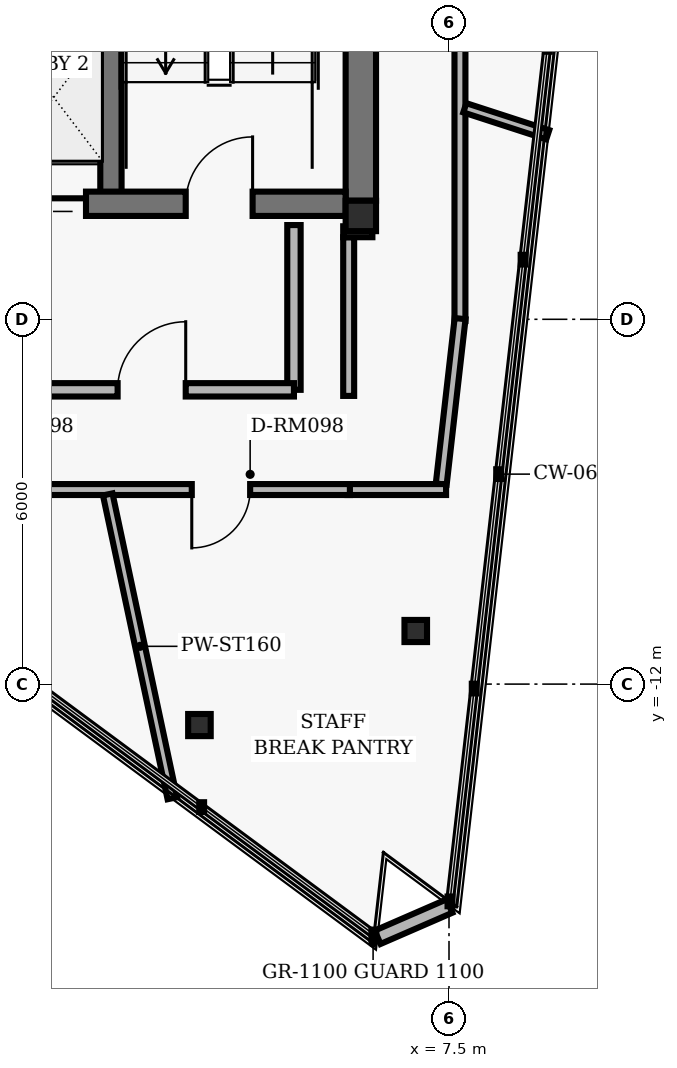
"""IFC4 building model, lengths in metres.
Left out: names, types, materials, properties, quantities, classifications, styles, units other than length and angle.
Written with IfcOpenShell. Run it as: python <this file> out.ifc"""

import sys

from ifc_helpers import new_model, si_unit, direction, frame, frame_2d, origin, origin_2d, place, context, subcontext, project, spatial, rectangle, hollow_rectangle, i_section, extrude, element, fill, save


model = new_model("IFC4")
c1 = context("Model", 3, precision=1e-05, world=origin(), true_north=direction((0.0, 1.0)))
c2 = subcontext(c1, "Body", "Model", "MODEL_VIEW")
j1 = project(units=[si_unit("LENGTHUNIT", "METRE"), si_unit("PLANEANGLEUNIT", "RADIAN")], contexts=[c1])
p1 = place(None, origin())
s1 = spatial("IfcSite", under=j1, at=p1, CompositionType="ELEMENT")
p2 = place(p1, origin())
s2 = spatial("IfcBuilding", under=s1, at=p2, CompositionType="ELEMENT")
p3 = place(p2, frame((0.0, 0.0, 249.12)))
s3 = spatial("IfcBuildingStorey", under=s2, at=p3, CompositionType="ELEMENT", Elevation=249.12)
p4 = place(p3, frame((6.05, -4.3, 0.0), z_axis=(0.0, 0.0, 1.0), x_axis=(1.0, 0.0, 0.0)))
e1 = element("IfcColumn", 1, at=p4, inside=s3, PredefinedType="COLUMN", context=c2, shape_type="SweptSolid", body=[
    extrude(hollow_rectangle(XDim=0.5, YDim=0.5, WallThickness=0.02, InnerFilletRadius=0.02, OuterFilletRadius=0.04, at=origin_2d()), origin(), (0.0, 0.0, 1.0), 2.88),
])
p5 = place(p3, frame((6.05, -4.05, 0.0), z_axis=(0.0, 0.0, 1.0), x_axis=(0.0, 1.0, 0.0)))
e2 = element("IfcWall", 2, at=p5, inside=s3, PredefinedType="SHEAR", context=c2, shape_type="SweptSolid", body=[
    extrude(rectangle(XDim=3.8, YDim=0.5, at=frame_2d((1.9, 0.0))), origin(), (0.0, 0.0, 1.0), 2.648),
])
p6 = place(p3, frame((1.94, -4.1, 0.0), z_axis=(0.0, 0.0, 1.0), x_axis=(0.0, 1.0, 0.0)))
e3 = element("IfcWall", 3, at=p6, inside=s3, PredefinedType="SHEAR", context=c2, shape_type="SweptSolid", body=[
    extrude(rectangle(XDim=8.2, YDim=0.35, at=frame_2d((4.1, 0.0))), origin(), (0.0, 0.0, 1.0), 2.648),
])
p7 = place(p3, frame((-5.8, -4.1, 0.0), z_axis=(0.0, 0.0, 1.0), x_axis=(1.0, 0.0, 0.0)))
e4 = element("IfcWall", 4, at=p7, inside=s3, PredefinedType="SHEAR", context=c2, shape_type="SweptSolid", body=[
    extrude(rectangle(XDim=11.6, YDim=0.4, at=frame_2d((5.8, 0.0))), origin(), (0.0, 0.0, 1.0), 2.648),
])
p8 = place(p7, frame((1.53, 0.0, 0.0)))
e5 = element("IfcOpeningElement", 5, at=p8, cuts=e4, PredefinedType="OPENING", context=c2, shape_type="SweptSolid", body=[
    extrude(rectangle(XDim=1.1, YDim=2.04, at=frame_2d((0.55, 1.02))), frame((0.0, 0.21, 0.0), z_axis=(0.0, -1.0, 0.0), x_axis=(1.0, 0.0, 0.0)), (0.0, 0.0, 1.0), 0.42),
])
p9 = place(p7, frame((8.97, 0.0, 0.0)))
e6 = element("IfcOpeningElement", 6, at=p9, cuts=e4, PredefinedType="OPENING", context=c2, shape_type="SweptSolid", body=[
    extrude(rectangle(XDim=1.1, YDim=2.04, at=frame_2d((0.55, 1.02))), frame((0.0, 0.21, 0.0), z_axis=(0.0, -1.0, 0.0), x_axis=(1.0, 0.0, 0.0)), (0.0, 0.0, 1.0), 0.42),
])
p10 = place(p7, frame((4.27, 0.0, 0.0)))
e7 = element("IfcOpeningElement", 7, at=p10, cuts=e4, PredefinedType="OPENING", context=c2, shape_type="SweptSolid", body=[
    extrude(rectangle(XDim=1.06, YDim=2.04, at=frame_2d((0.53, 1.02))), frame((0.0, 0.21, 0.0), z_axis=(0.0, -1.0, 0.0), x_axis=(1.0, 0.0, 0.0)), (0.0, 0.0, 1.0), 0.42),
])
p11 = place(p7, frame((6.27, 0.0, 0.0)))
e8 = element("IfcOpeningElement", 8, at=p11, cuts=e4, PredefinedType="OPENING", context=c2, shape_type="SweptSolid", body=[
    extrude(rectangle(XDim=1.06, YDim=2.04, at=frame_2d((0.53, 1.02))), frame((0.0, 0.21, 0.0), z_axis=(0.0, -1.0, 0.0), x_axis=(1.0, 0.0, 0.0)), (0.0, 0.0, 1.0), 0.42),
])
for number, where, z_axis, x_axis in (
    (9, (6.953, -11.127, 0.0), (0.0, 0.0, 1.0), (1.0, 0.0, 0.0)),
    (10, (3.396, -12.674, 0.0), (0.0, 0.0, 1.0), (1.0, 0.0, 0.0)),
):
    element("IfcColumn", number, at=place(p3, frame(where, z_axis=z_axis, x_axis=x_axis)), inside=s3, PredefinedType="COLUMN", context=c2, shape_type="SweptSolid", body=[
        extrude(i_section(OverallWidth=0.371, OverallDepth=0.364, WebThickness=0.013, FlangeThickness=0.022, FilletRadius=0.015, at=origin_2d()), origin(), (0.0, 0.0, 1.0), 2.88),
    ])
p12 = place(p3, frame((6.326, -16.164, 0.0), z_axis=(0.0, 0.0, 1.0), x_axis=(0.917064030228, 0.398739970986, 0.0)))
e11 = element("IfcWall", 11, at=p12, inside=s3, PredefinedType="PARAPET", context=c2, shape_type="SweptSolid", body=[
    extrude(rectangle(XDim=1.288, YDim=0.24, at=frame_2d((0.644, 0.0))), origin(), (0.0, 0.0, 1.0), 2.168),
])
p13 = place(p3, frame((4.95, -7.16, 0.0), z_axis=(0.0, 0.0, 1.0), x_axis=(0.0, 1.0, 0.0)))
e12 = element("IfcWall", 12, at=p13, inside=s3, PredefinedType="PARTITIONING", context=c2, shape_type="SweptSolid", body=[
    extrude(rectangle(XDim=2.71, YDim=0.22, at=frame_2d((1.355, 0.0))), origin(), (0.0, 0.0, 1.0), 2.623),
])
p14 = place(p3, frame((0.0, -7.16, 0.0), z_axis=(0.0, 0.0, 1.0), x_axis=(1.0, 0.0, 0.0)))
e13 = element("IfcWall", 13, at=p14, inside=s3, PredefinedType="PARTITIONING", context=c2, shape_type="SweptSolid", body=[
    extrude(rectangle(XDim=4.95, YDim=0.22, at=frame_2d((2.475, 0.0))), origin(), (0.0, 0.0, 1.0), 2.623),
])
p15 = place(p14, frame((2.05, 0.0, 0.0)))
e14 = element("IfcOpeningElement", 14, at=p15, cuts=e13, PredefinedType="OPENING", context=c2, shape_type="SweptSolid", body=[
    extrude(rectangle(XDim=1.12, YDim=2.02, at=frame_2d((0.56, 1.01))), frame((0.0, 0.12, 0.0), z_axis=(0.0, -1.0, 0.0), x_axis=(1.0, 0.0, 0.0)), (0.0, 0.0, 1.0), 0.24),
])
p16 = place(p3, frame((5.85, -7.26, 0.0), z_axis=(0.0, 0.0, 1.0), x_axis=(0.0, 1.0, 0.0)))
e15 = element("IfcWall", 15, at=p16, inside=s3, PredefinedType="PARTITIONING", context=c2, shape_type="SweptSolid", body=[
    extrude(rectangle(XDim=2.61, YDim=0.18, at=frame_2d((1.305, 0.0))), origin(), (0.0, 0.0, 1.0), 2.153),
])
p17 = place(p3, frame((5.76, -4.56, 0.0), z_axis=(0.0, 0.0, 1.0), x_axis=(1.0, 0.0, 0.0)))
e16 = element("IfcWall", 16, at=p17, inside=s3, PredefinedType="PARTITIONING", context=c2, shape_type="SweptSolid", body=[
    extrude(rectangle(XDim=0.48, YDim=0.18, at=frame_2d((0.24, 0.0))), origin(), (0.0, 0.0, 1.0), 2.623),
])
p18 = place(p3, frame((7.68, 7.22, 0.0), z_axis=(0.0, 0.0, 1.0), x_axis=(0.0, -1.0, 0.0)))
e17 = element("IfcWall", 17, at=p18, inside=s3, PredefinedType="PARTITIONING", context=c2, shape_type="SweptSolid", body=[
    extrude(rectangle(XDim=13.248, YDim=0.18, at=frame_2d((6.624, 0.0))), origin(), (0.0, 0.0, 1.0), 2.203),
])
p19 = place(p18, frame((4.52, 0.0, 0.0)))
e18 = element("IfcOpeningElement", 18, at=p19, cuts=e17, PredefinedType="OPENING", context=c2, shape_type="SweptSolid", body=[
    extrude(rectangle(XDim=0.96, YDim=2.02, at=frame_2d((0.48, 1.01))), frame((0.0, 0.1, 0.0), z_axis=(0.0, -1.0, 0.0), x_axis=(1.0, 0.0, 0.0)), (0.0, 0.0, 1.0), 0.2),
])
p20 = place(p3, frame((7.682, -5.989, 0.0), z_axis=(0.0, 0.0, 1.0), x_axis=(-0.113257574401, -0.993565660558, 0.0)))
e19 = element("IfcWall", 19, at=p20, inside=s3, PredefinedType="PARTITIONING", context=c2, shape_type="SweptSolid", body=[
    extrude(rectangle(XDim=2.74, YDim=0.18, at=frame_2d((1.37, 0.0))), origin(), (0.0, 0.0, 1.0), 2.203),
])
p21 = place(p3, frame((7.452, -8.8, 0.0), z_axis=(0.0, 0.0, 1.0), x_axis=(-1.0, 0.0, 0.0)))
e20 = element("IfcWall", 20, at=p21, inside=s3, PredefinedType="PARTITIONING", context=c2, shape_type="SweptSolid", body=[
    extrude(rectangle(XDim=1.622, YDim=0.18, at=frame_2d((0.811, 0.0))), origin(), (0.0, 0.0, 1.0), 2.623),
])
p22 = place(p3, frame((5.87, -8.8, 0.0), z_axis=(0.0, 0.0, 1.0), x_axis=(-1.0, 0.0, 0.0)))
e21 = element("IfcWall", 21, at=p22, inside=s3, PredefinedType="PARTITIONING", context=c2, shape_type="SweptSolid", body=[
    extrude(rectangle(XDim=7.86, YDim=0.18, at=frame_2d((3.93, 0.0))), origin(), (0.0, 0.0, 1.0), 2.623),
])
p23 = place(p22, frame((5.312, 0.0, 0.0)))
e22 = element("IfcOpeningElement", 22, at=p23, cuts=e21, PredefinedType="OPENING", context=c2, shape_type="SweptSolid", body=[
    extrude(rectangle(XDim=0.96, YDim=2.02, at=frame_2d((0.48, 1.01))), frame((0.0, 0.1, 0.0), z_axis=(0.0, -1.0, 0.0), x_axis=(1.0, 0.0, 0.0)), (0.0, 0.0, 1.0), 0.2),
])
p24 = place(p22, frame((1.64, 0.0, 0.0)))
e23 = element("IfcOpeningElement", 23, at=p24, cuts=e21, PredefinedType="OPENING", context=c2, shape_type="SweptSolid", body=[
    extrude(rectangle(XDim=0.96, YDim=2.02, at=frame_2d((0.48, 1.01))), frame((0.0, 0.1, 0.0), z_axis=(0.0, -1.0, 0.0), x_axis=(1.0, 0.0, 0.0)), (0.0, 0.0, 1.0), 0.2),
])
p25 = place(p3, frame((1.887, -8.88, 0.0), z_axis=(0.0, 0.0, 1.0), x_axis=(0.207919908666, -0.97814585394, 0.0)))
e24 = element("IfcWall", 24, at=p25, inside=s3, PredefinedType="PARTITIONING", context=c2, shape_type="SweptSolid", body=[
    extrude(rectangle(XDim=5.109, YDim=0.16, at=frame_2d((2.554, 0.0))), origin(), (0.0, 0.0, 1.0), 2.623),
])
p26 = place(p3, frame((7.76, -2.521, 0.0), z_axis=(0.0, 0.0, 1.0), x_axis=(0.951056587506, -0.30901677521, 0.0)))
e25 = element("IfcWall", 25, at=p26, inside=s3, PredefinedType="PARTITIONING", context=c2, shape_type="SweptSolid", body=[
    extrude(rectangle(XDim=1.434, YDim=0.16, at=frame_2d((0.717, 0.0))), origin(), (0.0, 0.0, 1.0), 2.623),
])
p27 = place(p9, origin())
e26 = element("IfcDoor", 26, at=p27, inside=s3, OperationType="SINGLE_SWING_RIGHT", PredefinedType="DOOR", context=c2, shape_type="SweptSolid", body=[
    extrude(rectangle(XDim=1.1, YDim=2.04, at=frame_2d((0.55, 1.02))), frame((0.0, 0.025, 0.0), z_axis=(0.0, -1.0, 0.0), x_axis=(1.0, 0.0, 0.0)), (0.0, 0.0, 1.0), 0.05),
])
fill(e6, e26)
p28 = place(p11, origin())
e27 = element("IfcDoor", 27, at=p28, inside=s3, OperationType="SLIDING_TO_RIGHT", PredefinedType="DOOR", context=c2, shape_type="SweptSolid", body=[
    extrude(rectangle(XDim=1.06, YDim=2.04, at=frame_2d((0.53, 1.02))), frame((0.0, 0.025, 0.0), z_axis=(0.0, -1.0, 0.0), x_axis=(1.0, 0.0, 0.0)), (0.0, 0.0, 1.0), 0.05),
])
fill(e8, e27)
p29 = place(p15, origin())
e28 = element("IfcDoor", 28, at=p29, inside=s3, OperationType="SINGLE_SWING_RIGHT", PredefinedType="DOOR", context=c2, shape_type="SweptSolid", body=[
    extrude(rectangle(XDim=1.12, YDim=2.02, at=frame_2d((0.56, 1.01))), frame((0.0, 0.025, 0.0), z_axis=(0.0, -1.0, 0.0), x_axis=(1.0, 0.0, 0.0)), (0.0, 0.0, 1.0), 0.05),
])
fill(e14, e28)
p30 = place(p24, origin())
e29 = element("IfcDoor", 29, at=p30, inside=s3, OperationType="SINGLE_SWING_RIGHT", PredefinedType="DOOR", context=c2, shape_type="SweptSolid", body=[
    extrude(rectangle(XDim=0.96, YDim=2.02, at=frame_2d((0.48, 1.01))), frame((0.0, 0.025, 0.0), z_axis=(0.0, -1.0, 0.0), x_axis=(1.0, 0.0, 0.0)), (0.0, 0.0, 1.0), 0.05),
])
fill(e23, e29)
save(model, sys.argv[1])
